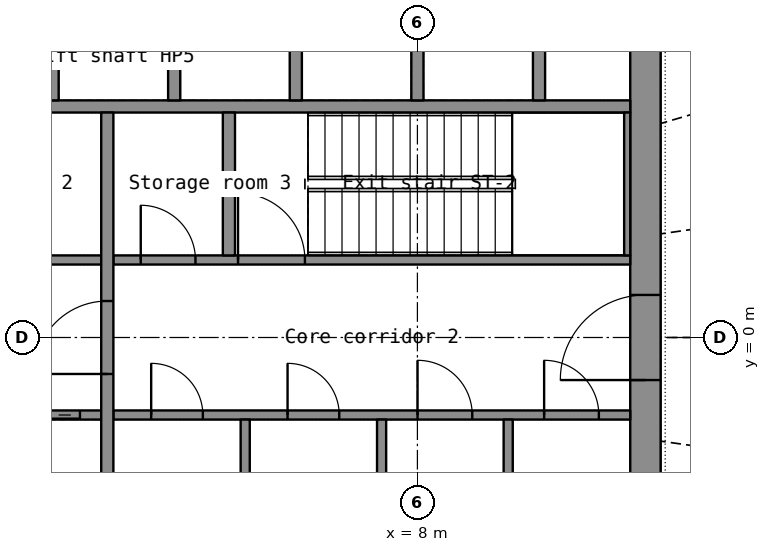
"""IFC4 building model, lengths in metres.
Left out: names, types, materials, properties, quantities, classifications, styles, units other than length and angle.
Written with IfcOpenShell. Run it as: python <this file> out.ifc"""

import sys

from ifc_helpers import new_model, si_unit, direction, frame, frame_2d, origin, place, context, subcontext, project, spatial, rectangle, extrude, element, fill, save


model = new_model("IFC4")
c1 = context("Model", 3, precision=1e-05, world=origin(), true_north=direction((0.0, 1.0)))
c2 = subcontext(c1, "Body", "Model", "MODEL_VIEW")
j1 = project(units=[si_unit("LENGTHUNIT", "METRE"), si_unit("PLANEANGLEUNIT", "RADIAN")], contexts=[c1])
p1 = place(None, origin())
s1 = spatial("IfcSite", under=j1, at=p1, CompositionType="ELEMENT")
p2 = place(p1, origin())
s2 = spatial("IfcBuilding", under=s1, at=p2, CompositionType="ELEMENT")
p3 = place(p2, frame((0.0, 0.0, 152.6)))
s3 = spatial("IfcBuildingStorey", under=s2, at=p3, CompositionType="ELEMENT", Elevation=152.6)
p4 = place(p3, frame((11.75, -7.2, 0.0), z_axis=(0.0, 0.0, 1.0), x_axis=(0.0, 1.0, 0.0)))
e1 = element("IfcWall", 1, at=p4, inside=s3, PredefinedType="SHEAR", context=c2, shape_type="SweptSolid", body=[
    extrude(rectangle(XDim=14.4, YDim=0.5, at=frame_2d((7.2, 0.0))), origin(), (0.0, 0.0, 1.0), 4.1),
])
p5 = place(p4, frame((6.5, 0.0, 0.0)))
e2 = element("IfcOpeningElement", 2, at=p5, cuts=e1, PredefinedType="OPENING", context=c2, shape_type="SweptSolid", body=[
    extrude(rectangle(XDim=1.4, YDim=2.2, at=frame_2d((0.7, 1.1))), frame((0.0, 0.26, 0.0), z_axis=(0.0, -1.0, 0.0), x_axis=(1.0, 0.0, 0.0)), (0.0, 0.0, 1.0), 0.52),
])
p6 = place(p3, frame((-11.5, 3.8, 0.0), z_axis=(0.0, 0.0, 1.0), x_axis=(1.0, 0.0, 0.0)))
e3 = element("IfcWall", 3, at=p6, inside=s3, PredefinedType="SHEAR", context=c2, shape_type="SweptSolid", body=[
    extrude(rectangle(XDim=23.0, YDim=0.2, at=frame_2d((11.5, 0.0))), origin(), (0.0, 0.0, 1.0), 4.1),
])
for number, where, z_axis, x_axis in (
    (4, (2.0, 3.9, 0.0), (0.0, 0.0, 1.0), (0.0, 1.0, 0.0)),
    (5, (4.0, 3.9, 0.0), (0.0, 0.0, 1.0), (0.0, 1.0, 0.0)),
    (6, (6.0, 3.9, 0.0), (0.0, 0.0, 1.0), (0.0, 1.0, 0.0)),
    (7, (8.0, 3.9, 0.0), (0.0, 0.0, 1.0), (0.0, 1.0, 0.0)),
    (8, (10.0, 3.9, 0.0), (0.0, 0.0, 1.0), (0.0, 1.0, 0.0)),
):
    element("IfcWall", number, at=place(p3, frame(where, z_axis=z_axis, x_axis=x_axis)), inside=s3, PredefinedType="SHEAR", context=c2, shape_type="SweptSolid", body=[
        extrude(rectangle(XDim=2.8, YDim=0.2, at=frame_2d((1.4, 0.0))), origin(), (0.0, 0.0, 1.0), 4.1),
    ])
p7 = place(p3, frame((-2.8, -1.275, 0.0), z_axis=(0.0, 0.0, 1.0), x_axis=(1.0, 0.0, 0.0)))
e9 = element("IfcWall", 9, at=p7, inside=s3, PredefinedType="SHEAR", context=c2, shape_type="SweptSolid", body=[
    extrude(rectangle(XDim=5.6, YDim=0.15, at=frame_2d((2.8, 0.0))), origin(), (0.0, 0.0, 1.0), 4.1),
])
p8 = place(p7, frame((4.15, 0.0, 0.0)))
e10 = element("IfcOpeningElement", 10, at=p8, cuts=e9, PredefinedType="OPENING", context=c2, shape_type="SweptSolid", body=[
    extrude(rectangle(XDim=1.1, YDim=2.2, at=frame_2d((0.55, 1.1))), frame((0.0, 0.085, 0.0), z_axis=(0.0, -1.0, 0.0), x_axis=(1.0, 0.0, 0.0)), (0.0, 0.0, 1.0), 0.17),
])
p9 = place(p7, frame((1.35, 0.0, 0.0)))
e11 = element("IfcOpeningElement", 11, at=p9, cuts=e9, PredefinedType="OPENING", context=c2, shape_type="SweptSolid", body=[
    extrude(rectangle(XDim=0.9, YDim=2.1, at=frame_2d((0.45, 1.05))), frame((0.0, 0.085, 0.0), z_axis=(0.0, -1.0, 0.0), x_axis=(1.0, 0.0, 0.0)), (0.0, 0.0, 1.0), 0.17),
])
p10 = place(p3, frame((3.0, -1.275, 0.0), z_axis=(0.0, 0.0, 1.0), x_axis=(1.0, 0.0, 0.0)))
e12 = element("IfcWall", 12, at=p10, inside=s3, PredefinedType="PARTITIONING", context=c2, shape_type="SweptSolid", body=[
    extrude(rectangle(XDim=8.5, YDim=0.15, at=frame_2d((4.25, 0.0))), origin(), (0.0, 0.0, 1.0), 4.1),
])
p11 = place(p10, frame((0.622, 0.0, 0.0)))
e13 = element("IfcOpeningElement", 13, at=p11, cuts=e12, PredefinedType="OPENING", context=c2, shape_type="SweptSolid", body=[
    extrude(rectangle(XDim=0.85, YDim=2.1, at=frame_2d((0.425, 1.05))), frame((0.0, 0.085, 0.0), z_axis=(0.0, -1.0, 0.0), x_axis=(1.0, 0.0, 0.0)), (0.0, 0.0, 1.0), 0.17),
])
p12 = place(p10, frame((2.865, 0.0, 0.0)))
e14 = element("IfcOpeningElement", 14, at=p12, cuts=e12, PredefinedType="OPENING", context=c2, shape_type="SweptSolid", body=[
    extrude(rectangle(XDim=0.85, YDim=2.1, at=frame_2d((0.425, 1.05))), frame((0.0, 0.085, 0.0), z_axis=(0.0, -1.0, 0.0), x_axis=(1.0, 0.0, 0.0)), (0.0, 0.0, 1.0), 0.17),
])
p13 = place(p10, frame((5.002, 0.0, 0.0)))
e15 = element("IfcOpeningElement", 15, at=p13, cuts=e12, PredefinedType="OPENING", context=c2, shape_type="SweptSolid", body=[
    extrude(rectangle(XDim=0.9, YDim=2.1, at=frame_2d((0.45, 1.05))), frame((0.0, 0.085, 0.0), z_axis=(0.0, -1.0, 0.0), x_axis=(1.0, 0.0, 0.0)), (0.0, 0.0, 1.0), 0.17),
])
p14 = place(p10, frame((7.084, 0.0, 0.0)))
e16 = element("IfcOpeningElement", 16, at=p14, cuts=e12, PredefinedType="OPENING", context=c2, shape_type="SweptSolid", body=[
    extrude(rectangle(XDim=0.9, YDim=2.1, at=frame_2d((0.45, 1.05))), frame((0.0, 0.085, 0.0), z_axis=(0.0, -1.0, 0.0), x_axis=(1.0, 0.0, 0.0)), (0.0, 0.0, 1.0), 0.17),
])
p15 = place(p3, frame((-2.8, 1.275, 0.0), z_axis=(0.0, 0.0, 1.0), x_axis=(1.0, 0.0, 0.0)))
e17 = element("IfcWall", 17, at=p15, inside=s3, PredefinedType="SHEAR", context=c2, shape_type="SweptSolid", body=[
    extrude(rectangle(XDim=5.6, YDim=0.15, at=frame_2d((2.8, 0.0))), origin(), (0.0, 0.0, 1.0), 4.1),
])
p16 = place(p15, frame((0.35, 0.0, 0.0)))
e18 = element("IfcOpeningElement", 18, at=p16, cuts=e17, PredefinedType="OPENING", context=c2, shape_type="SweptSolid", body=[
    extrude(rectangle(XDim=1.1, YDim=2.2, at=frame_2d((0.55, 1.1))), frame((0.0, 0.085, 0.0), z_axis=(0.0, -1.0, 0.0), x_axis=(1.0, 0.0, 0.0)), (0.0, 0.0, 1.0), 0.17),
])
p17 = place(p15, frame((3.35, 0.0, 0.0)))
e19 = element("IfcOpeningElement", 19, at=p17, cuts=e17, PredefinedType="OPENING", context=c2, shape_type="SweptSolid", body=[
    extrude(rectangle(XDim=0.9, YDim=2.1, at=frame_2d((0.45, 1.05))), frame((0.0, 0.085, 0.0), z_axis=(0.0, -1.0, 0.0), x_axis=(1.0, 0.0, 0.0)), (0.0, 0.0, 1.0), 0.17),
])
p18 = place(p3, frame((3.0, 1.275, 0.0), z_axis=(0.0, 0.0, 1.0), x_axis=(1.0, 0.0, 0.0)))
e20 = element("IfcWall", 20, at=p18, inside=s3, PredefinedType="SHEAR", context=c2, shape_type="SweptSolid", body=[
    extrude(rectangle(XDim=8.5, YDim=0.15, at=frame_2d((4.25, 0.0))), origin(), (0.0, 0.0, 1.0), 4.1),
])
p19 = place(p18, frame((2.05, 0.0, 0.0)))
e21 = element("IfcOpeningElement", 21, at=p19, cuts=e20, PredefinedType="OPENING", context=c2, shape_type="SweptSolid", body=[
    extrude(rectangle(XDim=1.1, YDim=2.15, at=frame_2d((0.55, 1.075))), frame((0.0, 0.085, 0.0), z_axis=(0.0, -1.0, 0.0), x_axis=(1.0, 0.0, 0.0)), (0.0, 0.0, 1.0), 0.17),
])
p20 = place(p18, frame((0.45, 0.0, 0.0)))
e22 = element("IfcOpeningElement", 22, at=p20, cuts=e20, PredefinedType="OPENING", context=c2, shape_type="SweptSolid", body=[
    extrude(rectangle(XDim=0.9, YDim=2.1, at=frame_2d((0.45, 1.05))), frame((0.0, 0.085, 0.0), z_axis=(0.0, -1.0, 0.0), x_axis=(1.0, 0.0, 0.0)), (0.0, 0.0, 1.0), 0.17),
])
p21 = place(p3, frame((2.9, -3.7, 0.0), z_axis=(0.0, 0.0, 1.0), x_axis=(0.0, 1.0, 0.0)))
e23 = element("IfcWall", 23, at=p21, inside=s3, PredefinedType="SHEAR", context=c2, shape_type="SweptSolid", body=[
    extrude(rectangle(XDim=7.4, YDim=0.2, at=frame_2d((3.7, 0.0))), origin(), (0.0, 0.0, 1.0), 4.1),
])
p22 = place(p21, frame((3.1, 0.0, 0.0)))
e24 = element("IfcOpeningElement", 24, at=p22, cuts=e23, PredefinedType="OPENING", context=c2, shape_type="SweptSolid", body=[
    extrude(rectangle(XDim=1.2, YDim=2.2, at=frame_2d((0.6, 1.1))), frame((0.0, 0.11, 0.0), z_axis=(0.0, -1.0, 0.0), x_axis=(1.0, 0.0, 0.0)), (0.0, 0.0, 1.0), 0.22),
])
p23 = place(p3, frame((11.45, 1.35, 0.0), z_axis=(0.0, 0.0, 1.0), x_axis=(0.0, 1.0, 0.0)))
e25 = element("IfcWall", 25, at=p23, inside=s3, PredefinedType="SHEAR", context=c2, shape_type="SweptSolid", body=[
    extrude(rectangle(XDim=2.35, YDim=0.1, at=frame_2d((1.175, 0.0))), origin(), (0.0, 0.0, 1.0), 4.1),
])
p24 = place(p3, frame((4.9, 1.35, 0.0), z_axis=(0.0, 0.0, 1.0), x_axis=(0.0, 1.0, 0.0)))
e26 = element("IfcWall", 26, at=p24, inside=s3, PredefinedType="SHEAR", context=c2, shape_type="SweptSolid", body=[
    extrude(rectangle(XDim=2.35, YDim=0.2, at=frame_2d((1.175, 0.0))), origin(), (0.0, 0.0, 1.0), 4.1),
])
for number, where, z_axis, x_axis in (
    (27, (5.168, -3.7, 0.0), (0.0, 0.0, 1.0), (0.0, 1.0, 0.0)),
    (28, (7.411, -3.7, 0.0), (0.0, 0.0, 1.0), (0.0, 1.0, 0.0)),
    (29, (9.493, -3.7, 0.0), (0.0, 0.0, 1.0), (0.0, 1.0, 0.0)),
):
    element("IfcWall", number, at=place(p3, frame(where, z_axis=z_axis, x_axis=x_axis)), inside=s3, PredefinedType="PARTITIONING", context=c2, shape_type="SweptSolid", body=[
        extrude(rectangle(XDim=2.35, YDim=0.15, at=frame_2d((1.175, 0.0))), origin(), (0.0, 0.0, 1.0), 4.1),
    ])
p25 = place(p5, origin())
e30 = element("IfcDoor", 30, at=p25, inside=s3, OperationType="DOUBLE_DOOR_SINGLE_SWING", PredefinedType="DOOR", context=c2, shape_type="SweptSolid", body=[
    extrude(rectangle(XDim=1.4, YDim=2.2, at=frame_2d((0.7, 1.1))), frame((0.0, 0.025, 0.0), z_axis=(0.0, -1.0, 0.0), x_axis=(1.0, 0.0, 0.0)), (0.0, 0.0, 1.0), 0.05),
])
fill(e2, e30)
p26 = place(p22, origin())
e31 = element("IfcDoor", 31, at=p26, inside=s3, OperationType="SINGLE_SWING_LEFT", PredefinedType="DOOR", context=c2, shape_type="SweptSolid", body=[
    extrude(rectangle(XDim=1.2, YDim=2.2, at=frame_2d((0.6, 1.1))), frame((0.0, 0.025, 0.0), z_axis=(0.0, -1.0, 0.0), x_axis=(1.0, 0.0, 0.0)), (0.0, 0.0, 1.0), 0.05),
])
fill(e24, e31)
p27 = place(p8, origin())
e32 = element("IfcDoor", 32, at=p27, inside=s3, OperationType="DOUBLE_DOOR_SLIDING", PredefinedType="DOOR", context=c2, shape_type="SweptSolid", body=[
    extrude(rectangle(XDim=1.1, YDim=2.2, at=frame_2d((0.55, 1.1))), frame((0.0, 0.025, 0.0), z_axis=(0.0, -1.0, 0.0), x_axis=(1.0, 0.0, 0.0)), (0.0, 0.0, 1.0), 0.05),
])
fill(e10, e32)
p28 = place(p19, origin())
e33 = element("IfcDoor", 33, at=p28, inside=s3, OperationType="SINGLE_SWING_LEFT", PredefinedType="DOOR", context=c2, shape_type="SweptSolid", body=[
    extrude(rectangle(XDim=1.1, YDim=2.15, at=frame_2d((0.55, 1.075))), frame((0.0, 0.025, 0.0), z_axis=(0.0, -1.0, 0.0), x_axis=(1.0, 0.0, 0.0)), (0.0, 0.0, 1.0), 0.05),
])
fill(e21, e33)
p29 = place(p11, origin())
e34 = element("IfcDoor", 34, at=p29, inside=s3, OperationType="SINGLE_SWING_LEFT", PredefinedType="DOOR", context=c2, shape_type="SweptSolid", body=[
    extrude(rectangle(XDim=0.85, YDim=2.1, at=frame_2d((0.425, 1.05))), frame((0.0, 0.025, 0.0), z_axis=(0.0, -1.0, 0.0), x_axis=(1.0, 0.0, 0.0)), (0.0, 0.0, 1.0), 0.05),
])
fill(e13, e34)
p30 = place(p12, origin())
e35 = element("IfcDoor", 35, at=p30, inside=s3, OperationType="SINGLE_SWING_LEFT", PredefinedType="DOOR", context=c2, shape_type="SweptSolid", body=[
    extrude(rectangle(XDim=0.85, YDim=2.1, at=frame_2d((0.425, 1.05))), frame((0.0, 0.025, 0.0), z_axis=(0.0, -1.0, 0.0), x_axis=(1.0, 0.0, 0.0)), (0.0, 0.0, 1.0), 0.05),
])
fill(e14, e35)
p31 = place(p13, origin())
e36 = element("IfcDoor", 36, at=p31, inside=s3, OperationType="SINGLE_SWING_LEFT", PredefinedType="DOOR", context=c2, shape_type="SweptSolid", body=[
    extrude(rectangle(XDim=0.9, YDim=2.1, at=frame_2d((0.45, 1.05))), frame((0.0, 0.025, 0.0), z_axis=(0.0, -1.0, 0.0), x_axis=(1.0, 0.0, 0.0)), (0.0, 0.0, 1.0), 0.05),
])
fill(e15, e36)
p32 = place(p14, origin())
e37 = element("IfcDoor", 37, at=p32, inside=s3, OperationType="SINGLE_SWING_LEFT", PredefinedType="DOOR", context=c2, shape_type="SweptSolid", body=[
    extrude(rectangle(XDim=0.9, YDim=2.1, at=frame_2d((0.45, 1.05))), frame((0.0, 0.025, 0.0), z_axis=(0.0, -1.0, 0.0), x_axis=(1.0, 0.0, 0.0)), (0.0, 0.0, 1.0), 0.05),
])
fill(e16, e37)
p33 = place(p20, origin())
e38 = element("IfcDoor", 38, at=p33, inside=s3, OperationType="SINGLE_SWING_LEFT", PredefinedType="DOOR", context=c2, shape_type="SweptSolid", body=[
    extrude(rectangle(XDim=0.9, YDim=2.1, at=frame_2d((0.45, 1.05))), frame((0.0, 0.025, 0.0), z_axis=(0.0, -1.0, 0.0), x_axis=(1.0, 0.0, 0.0)), (0.0, 0.0, 1.0), 0.05),
])
fill(e22, e38)
save(model, sys.argv[1])
